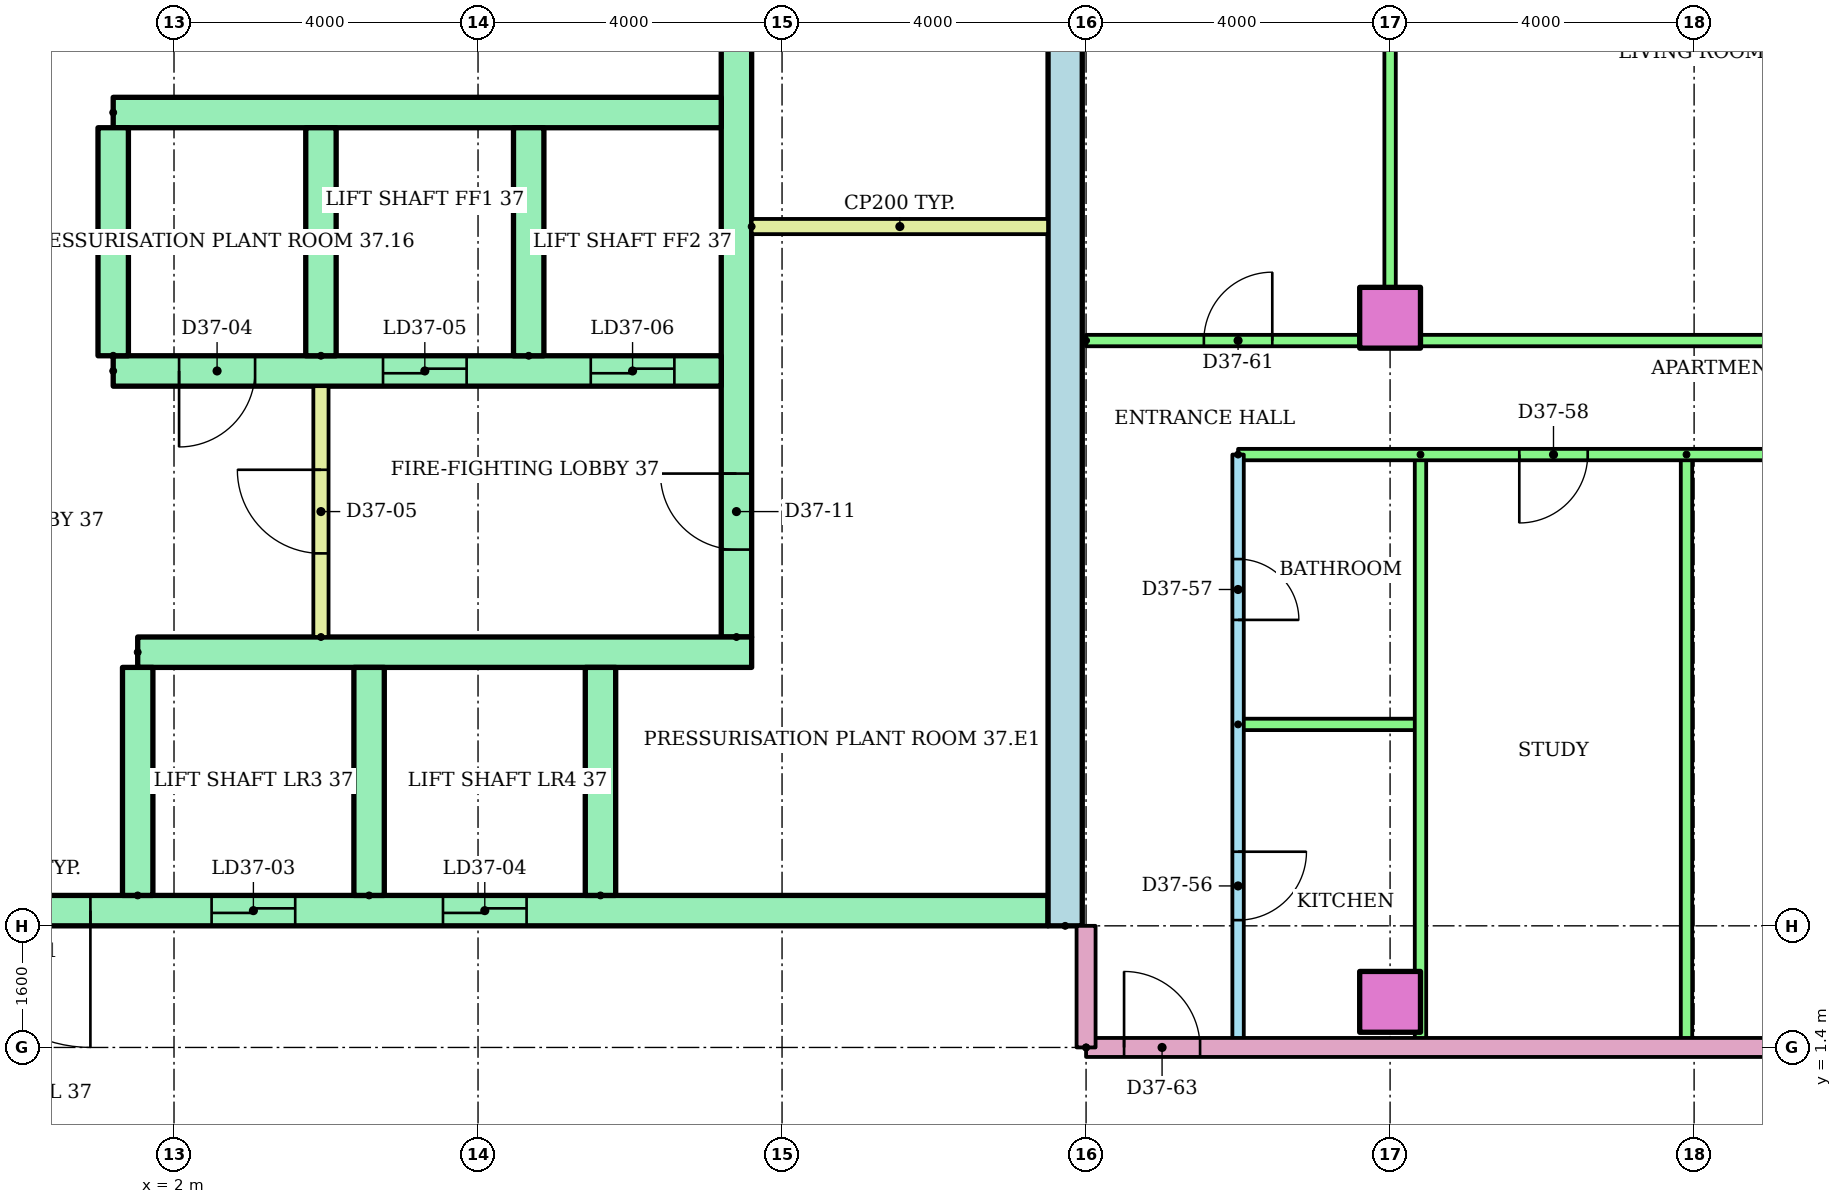
"""IFC4 building model, lengths in metres.
Left out: names, types, materials, properties, quantities, classifications, styles, units other than length and angle.
Written with IfcOpenShell. Run it as: python <this file> out.ifc"""

import sys

from ifc_helpers import new_model, si_unit, direction, frame, frame_2d, origin, origin_2d, place, context, subcontext, project, spatial, rectangle, extrude, element, fill, save


model = new_model("IFC4")
c1 = context("Model", 3, precision=1e-05, world=origin(), true_north=direction((0.0, 1.0)))
c2 = subcontext(c1, "Body", "Model", "MODEL_VIEW")
j1 = project(units=[si_unit("LENGTHUNIT", "METRE"), si_unit("PLANEANGLEUNIT", "RADIAN")], contexts=[c1])
p1 = place(None, origin())
s1 = spatial("IfcSite", under=j1, at=p1, CompositionType="ELEMENT")
p2 = place(p1, origin())
s2 = spatial("IfcBuilding", under=s1, at=p2, CompositionType="ELEMENT")
p3 = place(p2, frame((0.0, 0.0, 142.2)))
s3 = spatial("IfcBuildingStorey", under=s2, at=p3, CompositionType="ELEMENT", Elevation=142.2)
for number, where in (
    (1, (18.0, 2.0, 0.0)),
    (2, (18.0, 11.0, 0.0)),
):
    element("IfcColumn", number, at=place(p3, frame(where)), inside=s3, PredefinedType="COLUMN", context=c2, shape_type="SweptSolid", body=[
        extrude(rectangle(XDim=0.8, YDim=0.8, at=origin_2d()), origin(), (0.0, 0.0, 1.0), 3.2),
    ])
p4 = place(p3, frame((13.725, 3.0, 0.0), z_axis=(0.0, 0.0, 1.0), x_axis=(0.0, 1.0, 0.0)))
e3 = element("IfcWall", 3, at=p4, inside=s3, PredefinedType="SHEAR", context=c2, shape_type="SweptSolid", body=[
    extrude(rectangle(XDim=17.0, YDim=0.45, at=frame_2d((8.5, 0.0))), origin(), (0.0, 0.0, 1.0), 2.92),
])
p5 = place(p3, frame((9.4, 6.8, 0.0), z_axis=(0.0, 0.0, 1.0), x_axis=(0.0, 1.0, 0.0)))
e4 = element("IfcWall", 4, at=p5, inside=s3, PredefinedType="SHEAR", context=c2, shape_type="SweptSolid", body=[
    extrude(rectangle(XDim=12.7, YDim=0.4, at=frame_2d((6.35, 0.0))), origin(), (0.0, 0.0, 1.0), 2.92),
])
p6 = place(p5, frame((1.15, 0.0, 0.0)))
e5 = element("IfcOpeningElement", 5, at=p6, cuts=e4, PredefinedType="OPENING", context=c2, shape_type="SweptSolid", body=[
    extrude(rectangle(XDim=1.0, YDim=2.1, at=frame_2d((0.5, 1.05))), frame((0.0, 0.21, 0.0), z_axis=(0.0, -1.0, 0.0), x_axis=(1.0, 0.0, 0.0)), (0.0, 0.0, 1.0), 0.42),
])
p7 = place(p5, frame((7.925, 0.0, 0.0)))
e6 = element("IfcOpeningElement", 6, at=p7, cuts=e4, PredefinedType="OPENING", context=c2, shape_type="SweptSolid", body=[
    extrude(rectangle(XDim=1.0, YDim=2.1, at=frame_2d((0.5, 1.05))), frame((0.0, 0.21, 0.0), z_axis=(0.0, -1.0, 0.0), x_axis=(1.0, 0.0, 0.0)), (0.0, 0.0, 1.0), 0.42),
])
p8 = place(p3, frame((-13.5, 3.2, 0.0)))
e7 = element("IfcWall", 7, at=p8, inside=s3, PredefinedType="SHEAR", context=c2, shape_type="SweptSolid", body=[
    extrude(rectangle(XDim=27.0, YDim=0.4, at=frame_2d((13.5, 0.0))), origin(), (0.0, 0.0, 1.0), 2.92),
])
p9 = place(p8, frame((6.861, 0.0, 0.0)))
e8 = element("IfcOpeningElement", 8, at=p9, cuts=e7, PredefinedType="OPENING", context=c2, shape_type="SweptSolid", body=[
    extrude(rectangle(XDim=1.1, YDim=2.1, at=frame_2d((0.55, 1.05))), frame((0.0, 0.21, 0.0), z_axis=(0.0, -1.0, 0.0), x_axis=(1.0, 0.0, 0.0)), (0.0, 0.0, 1.0), 0.42),
])
p10 = place(p8, frame((9.906, 0.0, 0.0)))
e9 = element("IfcOpeningElement", 9, at=p10, cuts=e7, PredefinedType="OPENING", context=c2, shape_type="SweptSolid", body=[
    extrude(rectangle(XDim=1.1, YDim=2.1, at=frame_2d((0.55, 1.05))), frame((0.0, 0.21, 0.0), z_axis=(0.0, -1.0, 0.0), x_axis=(1.0, 0.0, 0.0)), (0.0, 0.0, 1.0), 0.42),
])
p11 = place(p8, frame((15.994, 0.0, 0.0)))
e10 = element("IfcOpeningElement", 10, at=p11, cuts=e7, PredefinedType="OPENING", context=c2, shape_type="SweptSolid", body=[
    extrude(rectangle(XDim=1.1, YDim=2.1, at=frame_2d((0.55, 1.05))), frame((0.0, 0.21, 0.0), z_axis=(0.0, -1.0, 0.0), x_axis=(1.0, 0.0, 0.0)), (0.0, 0.0, 1.0), 0.42),
])
p12 = place(p8, frame((19.039, 0.0, 0.0)))
e11 = element("IfcOpeningElement", 11, at=p12, cuts=e7, PredefinedType="OPENING", context=c2, shape_type="SweptSolid", body=[
    extrude(rectangle(XDim=1.1, YDim=2.1, at=frame_2d((0.55, 1.05))), frame((0.0, 0.21, 0.0), z_axis=(0.0, -1.0, 0.0), x_axis=(1.0, 0.0, 0.0)), (0.0, 0.0, 1.0), 0.42),
])
p13 = place(p8, frame((12.6, 0.0, 0.0)))
e12 = element("IfcOpeningElement", 12, at=p13, cuts=e7, PredefinedType="OPENING", context=c2, shape_type="SweptSolid", body=[
    extrude(rectangle(XDim=1.8, YDim=2.1, at=frame_2d((0.9, 1.05))), frame((0.0, 0.21, 0.0), z_axis=(0.0, -1.0, 0.0), x_axis=(1.0, 0.0, 0.0)), (0.0, 0.0, 1.0), 0.42),
])
p14 = place(p3, frame((1.522, 6.6, 0.0)))
e13 = element("IfcWall", 13, at=p14, inside=s3, PredefinedType="SHEAR", context=c2, shape_type="SweptSolid", body=[
    extrude(rectangle(XDim=8.078, YDim=0.4, at=frame_2d((4.039, 0.0))), origin(), (0.0, 0.0, 1.0), 2.92),
])
for number, where, z_axis, x_axis in (
    (14, (1.522, 3.4, 0.0), (0.0, 0.0, 1.0), (0.0, 1.0, 0.0)),
    (15, (4.567, 3.4, 0.0), (0.0, 0.0, 1.0), (0.0, 1.0, 0.0)),
    (16, (7.611, 3.4, 0.0), (0.0, 0.0, 1.0), (0.0, 1.0, 0.0)),
):
    element("IfcWall", number, at=place(p3, frame(where, z_axis=z_axis, x_axis=x_axis)), inside=s3, PredefinedType="SHEAR", context=c2, shape_type="SweptSolid", body=[
        extrude(rectangle(XDim=3.0, YDim=0.4, at=frame_2d((1.5, 0.0))), origin(), (0.0, 0.0, 1.0), 2.92),
    ])
p15 = place(p3, frame((1.2, 10.3, 0.0)))
e17 = element("IfcWall", 17, at=p15, inside=s3, PredefinedType="SHEAR", context=c2, shape_type="SweptSolid", body=[
    extrude(rectangle(XDim=8.0, YDim=0.4, at=frame_2d((4.0, 0.0))), origin(), (0.0, 0.0, 1.0), 2.92),
])
p16 = place(p15, frame((3.55, 0.0, 0.0)))
e18 = element("IfcOpeningElement", 18, at=p16, cuts=e17, PredefinedType="OPENING", context=c2, shape_type="SweptSolid", body=[
    extrude(rectangle(XDim=1.1, YDim=2.1, at=frame_2d((0.55, 1.05))), frame((0.0, 0.21, 0.0), z_axis=(0.0, -1.0, 0.0), x_axis=(1.0, 0.0, 0.0)), (0.0, 0.0, 1.0), 0.42),
])
p17 = place(p15, frame((6.283, 0.0, 0.0)))
e19 = element("IfcOpeningElement", 19, at=p17, cuts=e17, PredefinedType="OPENING", context=c2, shape_type="SweptSolid", body=[
    extrude(rectangle(XDim=1.1, YDim=2.1, at=frame_2d((0.55, 1.05))), frame((0.0, 0.21, 0.0), z_axis=(0.0, -1.0, 0.0), x_axis=(1.0, 0.0, 0.0)), (0.0, 0.0, 1.0), 0.42),
])
p18 = place(p15, frame((0.867, 0.0, 0.0)))
e20 = element("IfcOpeningElement", 20, at=p18, cuts=e17, PredefinedType="OPENING", context=c2, shape_type="SweptSolid", body=[
    extrude(rectangle(XDim=1.0, YDim=2.1, at=frame_2d((0.5, 1.05))), frame((0.0, 0.21, 0.0), z_axis=(0.0, -1.0, 0.0), x_axis=(1.0, 0.0, 0.0)), (0.0, 0.0, 1.0), 0.42),
])
p19 = place(p3, frame((1.2, 13.7, 0.0)))
e21 = element("IfcWall", 21, at=p19, inside=s3, PredefinedType="SHEAR", context=c2, shape_type="SweptSolid", body=[
    extrude(rectangle(XDim=8.0, YDim=0.4, at=frame_2d((4.0, 0.0))), origin(), (0.0, 0.0, 1.0), 2.92),
])
for number, where, z_axis, x_axis in (
    (22, (1.2, 10.5, 0.0), (0.0, 0.0, 1.0), (0.0, 1.0, 0.0)),
    (23, (3.933, 10.5, 0.0), (0.0, 0.0, 1.0), (0.0, 1.0, 0.0)),
    (24, (6.667, 10.5, 0.0), (0.0, 0.0, 1.0), (0.0, 1.0, 0.0)),
):
    element("IfcWall", number, at=place(p3, frame(where, z_axis=z_axis, x_axis=x_axis)), inside=s3, PredefinedType="SHEAR", context=c2, shape_type="SweptSolid", body=[
        extrude(rectangle(XDim=3.0, YDim=0.4, at=frame_2d((1.5, 0.0))), origin(), (0.0, 0.0, 1.0), 2.92),
    ])
p20 = place(p3, frame((3.933, 6.8, 0.0), z_axis=(0.0, 0.0, 1.0), x_axis=(0.0, 1.0, 0.0)))
e25 = element("IfcWall", 25, at=p20, inside=s3, PredefinedType="PARTITIONING", context=c2, shape_type="SweptSolid", body=[
    extrude(rectangle(XDim=3.3, YDim=0.2, at=frame_2d((1.65, 0.0))), origin(), (0.0, 0.0, 1.0), 2.92),
])
p21 = place(p20, frame((1.1, 0.0, 0.0)))
e26 = element("IfcOpeningElement", 26, at=p21, cuts=e25, PredefinedType="OPENING", context=c2, shape_type="SweptSolid", body=[
    extrude(rectangle(XDim=1.1, YDim=2.1, at=frame_2d((0.55, 1.05))), frame((0.0, 0.11, 0.0), z_axis=(0.0, -1.0, 0.0), x_axis=(1.0, 0.0, 0.0)), (0.0, 0.0, 1.0), 0.22),
])
p22 = place(p3, frame((9.6, 12.2, 0.0)))
e27 = element("IfcWall", 27, at=p22, inside=s3, PredefinedType="PARTITIONING", context=c2, shape_type="SweptSolid", body=[
    extrude(rectangle(XDim=3.9, YDim=0.2, at=frame_2d((1.95, 0.0))), origin(), (0.0, 0.0, 1.0), 2.92),
])
p23 = place(p3, frame((16.0, 9.2, 0.0), z_axis=(0.0, 0.0, 1.0), x_axis=(0.0, -1.0, 0.0)))
e28 = element("IfcWall", 28, at=p23, inside=s3, PredefinedType="PARTITIONING", context=c2, shape_type="SweptSolid", body=[
    extrude(rectangle(XDim=7.8, YDim=0.15, at=frame_2d((3.9, 0.0))), origin(), (0.0, 0.0, 1.0), 2.4),
])
p24 = place(p23, frame((5.225, 0.0, 0.0)))
e29 = element("IfcOpeningElement", 29, at=p24, cuts=e28, PredefinedType="OPENING", context=c2, shape_type="SweptSolid", body=[
    extrude(rectangle(XDim=0.9, YDim=2.1, at=frame_2d((0.45, 1.05))), frame((0.0, 0.085, 0.0), z_axis=(0.0, -1.0, 0.0), x_axis=(1.0, 0.0, 0.0)), (0.0, 0.0, 1.0), 0.17),
])
p25 = place(p23, frame((1.375, 0.0, 0.0)))
e30 = element("IfcOpeningElement", 30, at=p25, cuts=e28, PredefinedType="OPENING", context=c2, shape_type="SweptSolid", body=[
    extrude(rectangle(XDim=0.8, YDim=2.1, at=frame_2d((0.4, 1.05))), frame((0.0, 0.085, 0.0), z_axis=(0.0, -1.0, 0.0), x_axis=(1.0, 0.0, 0.0)), (0.0, 0.0, 1.0), 0.17),
])
p26 = place(p3, frame((16.0, 5.65, 0.0)))
e31 = element("IfcWall", 31, at=p26, inside=s3, PredefinedType="PARTITIONING", context=c2, shape_type="SweptSolid", body=[
    extrude(rectangle(XDim=2.4, YDim=0.15, at=frame_2d((1.2, 0.0))), origin(), (0.0, 0.0, 1.0), 2.4),
])
for number, where, z_axis, x_axis in (
    (32, (18.4, 9.2, 0.0), (0.0, 0.0, 1.0), (0.0, -1.0, 0.0)),
    (33, (21.9, 9.2, 0.0), (0.0, 0.0, 1.0), (0.0, -1.0, 0.0)),
):
    element("IfcWall", number, at=place(p3, frame(where, z_axis=z_axis, x_axis=x_axis)), inside=s3, PredefinedType="PARTITIONING", context=c2, shape_type="SweptSolid", body=[
        extrude(rectangle(XDim=7.8, YDim=0.15, at=frame_2d((3.9, 0.0))), origin(), (0.0, 0.0, 1.0), 2.4),
    ])
p27 = place(p3, frame((32.71, 9.2, 0.0), z_axis=(0.0, 0.0, 1.0), x_axis=(-1.0, 0.0, 0.0)))
e34 = element("IfcWall", 34, at=p27, inside=s3, PredefinedType="PARTITIONING", context=c2, shape_type="SweptSolid", body=[
    extrude(rectangle(XDim=16.71, YDim=0.15, at=frame_2d((8.355, 0.0))), origin(), (0.0, 0.0, 1.0), 2.4),
])
p28 = place(p27, frame((12.11, 0.0, 0.0)))
e35 = element("IfcOpeningElement", 35, at=p28, cuts=e34, PredefinedType="OPENING", context=c2, shape_type="SweptSolid", body=[
    extrude(rectangle(XDim=0.9, YDim=2.1, at=frame_2d((0.45, 1.05))), frame((0.0, 0.085, 0.0), z_axis=(0.0, -1.0, 0.0), x_axis=(1.0, 0.0, 0.0)), (0.0, 0.0, 1.0), 0.17),
])
p29 = place(p27, frame((7.985, 0.0, 0.0)))
e36 = element("IfcOpeningElement", 36, at=p29, cuts=e34, PredefinedType="OPENING", context=c2, shape_type="SweptSolid", body=[
    extrude(rectangle(XDim=0.9, YDim=2.1, at=frame_2d((0.45, 1.05))), frame((0.0, 0.085, 0.0), z_axis=(0.0, -1.0, 0.0), x_axis=(1.0, 0.0, 0.0)), (0.0, 0.0, 1.0), 0.17),
])
p30 = place(p27, frame((2.685, 0.0, 0.0)))
e37 = element("IfcOpeningElement", 37, at=p30, cuts=e34, PredefinedType="OPENING", context=c2, shape_type="SweptSolid", body=[
    extrude(rectangle(XDim=0.9, YDim=2.1, at=frame_2d((0.45, 1.05))), frame((0.0, 0.085, 0.0), z_axis=(0.0, -1.0, 0.0), x_axis=(1.0, 0.0, 0.0)), (0.0, 0.0, 1.0), 0.17),
])
p31 = place(p3, frame((14.0, 10.7, 0.0)))
e38 = element("IfcWall", 38, at=p31, inside=s3, PredefinedType="PARTITIONING", context=c2, shape_type="SweptSolid", body=[
    extrude(rectangle(XDim=18.71, YDim=0.15, at=frame_2d((9.355, 0.0))), origin(), (0.0, 0.0, 1.0), 2.4),
])
p32 = place(p31, frame((1.55, 0.0, 0.0)))
e39 = element("IfcOpeningElement", 39, at=p32, cuts=e38, PredefinedType="OPENING", context=c2, shape_type="SweptSolid", body=[
    extrude(rectangle(XDim=0.9, YDim=2.1, at=frame_2d((0.45, 1.05))), frame((0.0, 0.085, 0.0), z_axis=(0.0, -1.0, 0.0), x_axis=(1.0, 0.0, 0.0)), (0.0, 0.0, 1.0), 0.17),
])
p33 = place(p31, frame((10.382, 0.0, 0.0)))
e40 = element("IfcOpeningElement", 40, at=p33, cuts=e38, PredefinedType="OPENING", context=c2, shape_type="SweptSolid", body=[
    extrude(rectangle(XDim=1.0, YDim=2.1, at=frame_2d((0.5, 1.05))), frame((0.0, 0.085, 0.0), z_axis=(0.0, -1.0, 0.0), x_axis=(1.0, 0.0, 0.0)), (0.0, 0.0, 1.0), 0.17),
])
p34 = place(p3, frame((18.0, 18.721, 0.0), z_axis=(0.0, 0.0, 1.0), x_axis=(0.0, -1.0, 0.0)))
e41 = element("IfcWall", 41, at=p34, inside=s3, PredefinedType="PARTITIONING", context=c2, shape_type="SweptSolid", body=[
    extrude(rectangle(XDim=8.021, YDim=0.15, at=frame_2d((4.01, 0.0))), origin(), (0.0, 0.0, 1.0), 2.4),
])
p35 = place(p3, frame((14.0, 1.4, 0.0)))
e42 = element("IfcWall", 42, at=p35, inside=s3, PredefinedType="PARTITIONING", context=c2, shape_type="SweptSolid", body=[
    extrude(rectangle(XDim=15.0, YDim=0.25, at=frame_2d((7.5, 0.0))), origin(), (0.0, 0.0, 1.0), 2.4),
])
p36 = place(p35, frame((0.5, 0.0, 0.0)))
e43 = element("IfcOpeningElement", 43, at=p36, cuts=e42, PredefinedType="OPENING", context=c2, shape_type="SweptSolid", body=[
    extrude(rectangle(XDim=1.0, YDim=2.1, at=frame_2d((0.5, 1.05))), frame((0.0, 0.135, 0.0), z_axis=(0.0, -1.0, 0.0), x_axis=(1.0, 0.0, 0.0)), (0.0, 0.0, 1.0), 0.27),
])
p37 = place(p3, frame((14.0, 1.4, 0.0), z_axis=(0.0, 0.0, 1.0), x_axis=(0.0, 1.0, 0.0)))
e44 = element("IfcWall", 44, at=p37, inside=s3, PredefinedType="PARTITIONING", context=c2, shape_type="SweptSolid", body=[
    extrude(rectangle(XDim=1.6, YDim=0.25, at=frame_2d((0.8, 0.0))), origin(), (0.0, 0.0, 1.0), 2.4),
])
p38 = place(p11, origin())
e45 = element("IfcDoor", 45, at=p38, inside=s3, OperationType="SLIDING_TO_LEFT", PredefinedType="DOOR", context=c2, shape_type="SweptSolid", body=[
    extrude(rectangle(XDim=1.1, YDim=2.1, at=frame_2d((0.55, 1.05))), frame((0.0, 0.025, 0.0), z_axis=(0.0, -1.0, 0.0), x_axis=(1.0, 0.0, 0.0)), (0.0, 0.0, 1.0), 0.05),
])
fill(e10, e45)
p39 = place(p12, origin())
e46 = element("IfcDoor", 46, at=p39, inside=s3, OperationType="SLIDING_TO_LEFT", PredefinedType="DOOR", context=c2, shape_type="SweptSolid", body=[
    extrude(rectangle(XDim=1.1, YDim=2.1, at=frame_2d((0.55, 1.05))), frame((0.0, 0.025, 0.0), z_axis=(0.0, -1.0, 0.0), x_axis=(1.0, 0.0, 0.0)), (0.0, 0.0, 1.0), 0.05),
])
fill(e11, e46)
p40 = place(p13, frame((1.8, 0.0, 0.0), z_axis=(0.0, 0.0, 1.0), x_axis=(-1.0, 0.0, 0.0)))
e47 = element("IfcDoor", 47, at=p40, inside=s3, OperationType="DOUBLE_DOOR_SINGLE_SWING", PredefinedType="DOOR", context=c2, shape_type="SweptSolid", body=[
    extrude(rectangle(XDim=1.8, YDim=2.1, at=frame_2d((0.9, 1.05))), frame((0.0, 0.025, 0.0), z_axis=(0.0, -1.0, 0.0), x_axis=(1.0, 0.0, 0.0)), (0.0, 0.0, 1.0), 0.05),
])
fill(e12, e47)
p41 = place(p16, origin())
e48 = element("IfcDoor", 48, at=p41, inside=s3, OperationType="SLIDING_TO_LEFT", PredefinedType="DOOR", context=c2, shape_type="SweptSolid", body=[
    extrude(rectangle(XDim=1.1, YDim=2.1, at=frame_2d((0.55, 1.05))), frame((0.0, 0.025, 0.0), z_axis=(0.0, -1.0, 0.0), x_axis=(1.0, 0.0, 0.0)), (0.0, 0.0, 1.0), 0.05),
])
fill(e18, e48)
p42 = place(p17, origin())
e49 = element("IfcDoor", 49, at=p42, inside=s3, OperationType="SLIDING_TO_LEFT", PredefinedType="DOOR", context=c2, shape_type="SweptSolid", body=[
    extrude(rectangle(XDim=1.1, YDim=2.1, at=frame_2d((0.55, 1.05))), frame((0.0, 0.025, 0.0), z_axis=(0.0, -1.0, 0.0), x_axis=(1.0, 0.0, 0.0)), (0.0, 0.0, 1.0), 0.05),
])
fill(e19, e49)
p43 = place(p18, frame((1.0, 0.0, 0.0), z_axis=(0.0, 0.0, 1.0), x_axis=(-1.0, 0.0, 0.0)))
e50 = element("IfcDoor", 50, at=p43, inside=s3, OperationType="SINGLE_SWING_LEFT", PredefinedType="DOOR", context=c2, shape_type="SweptSolid", body=[
    extrude(rectangle(XDim=1.0, YDim=2.1, at=frame_2d((0.5, 1.05))), frame((0.0, 0.025, 0.0), z_axis=(0.0, -1.0, 0.0), x_axis=(1.0, 0.0, 0.0)), (0.0, 0.0, 1.0), 0.05),
])
fill(e20, e50)
p44 = place(p21, origin())
e51 = element("IfcDoor", 51, at=p44, inside=s3, OperationType="SINGLE_SWING_RIGHT", PredefinedType="DOOR", context=c2, shape_type="SweptSolid", body=[
    extrude(rectangle(XDim=1.1, YDim=2.1, at=frame_2d((0.55, 1.05))), frame((0.0, 0.025, 0.0), z_axis=(0.0, -1.0, 0.0), x_axis=(1.0, 0.0, 0.0)), (0.0, 0.0, 1.0), 0.05),
])
fill(e26, e51)
p45 = place(p6, origin())
e52 = element("IfcDoor", 52, at=p45, inside=s3, OperationType="SINGLE_SWING_RIGHT", PredefinedType="DOOR", context=c2, shape_type="SweptSolid", body=[
    extrude(rectangle(XDim=1.0, YDim=2.1, at=frame_2d((0.5, 1.05))), frame((0.0, 0.025, 0.0), z_axis=(0.0, -1.0, 0.0), x_axis=(1.0, 0.0, 0.0)), (0.0, 0.0, 1.0), 0.05),
])
fill(e5, e52)
p46 = place(p24, origin())
e53 = element("IfcDoor", 53, at=p46, inside=s3, OperationType="SINGLE_SWING_LEFT", PredefinedType="DOOR", context=c2, shape_type="SweptSolid", body=[
    extrude(rectangle(XDim=0.9, YDim=2.1, at=frame_2d((0.45, 1.05))), frame((0.0, 0.025, 0.0), z_axis=(0.0, -1.0, 0.0), x_axis=(1.0, 0.0, 0.0)), (0.0, 0.0, 1.0), 0.05),
])
fill(e29, e53)
p47 = place(p25, origin())
e54 = element("IfcDoor", 54, at=p47, inside=s3, OperationType="SINGLE_SWING_RIGHT", PredefinedType="DOOR", context=c2, shape_type="SweptSolid", body=[
    extrude(rectangle(XDim=0.8, YDim=2.1, at=frame_2d((0.4, 1.05))), frame((0.0, 0.025, 0.0), z_axis=(0.0, -1.0, 0.0), x_axis=(1.0, 0.0, 0.0)), (0.0, 0.0, 1.0), 0.05),
])
fill(e30, e54)
p48 = place(p28, origin())
e55 = element("IfcDoor", 55, at=p48, inside=s3, OperationType="SINGLE_SWING_RIGHT", PredefinedType="DOOR", context=c2, shape_type="SweptSolid", body=[
    extrude(rectangle(XDim=0.9, YDim=2.1, at=frame_2d((0.45, 1.05))), frame((0.0, 0.025, 0.0), z_axis=(0.0, -1.0, 0.0), x_axis=(1.0, 0.0, 0.0)), (0.0, 0.0, 1.0), 0.05),
])
fill(e35, e55)
p49 = place(p32, origin())
e56 = element("IfcDoor", 56, at=p49, inside=s3, OperationType="SINGLE_SWING_RIGHT", PredefinedType="DOOR", context=c2, shape_type="SweptSolid", body=[
    extrude(rectangle(XDim=0.9, YDim=2.1, at=frame_2d((0.45, 1.05))), frame((0.0, 0.025, 0.0), z_axis=(0.0, -1.0, 0.0), x_axis=(1.0, 0.0, 0.0)), (0.0, 0.0, 1.0), 0.05),
])
fill(e39, e56)
p50 = place(p36, origin())
e57 = element("IfcDoor", 57, at=p50, inside=s3, OperationType="SINGLE_SWING_LEFT", PredefinedType="DOOR", context=c2, shape_type="SweptSolid", body=[
    extrude(rectangle(XDim=1.0, YDim=2.1, at=frame_2d((0.5, 1.05))), frame((0.0, 0.025, 0.0), z_axis=(0.0, -1.0, 0.0), x_axis=(1.0, 0.0, 0.0)), (0.0, 0.0, 1.0), 0.05),
])
fill(e43, e57)
save(model, sys.argv[1])
